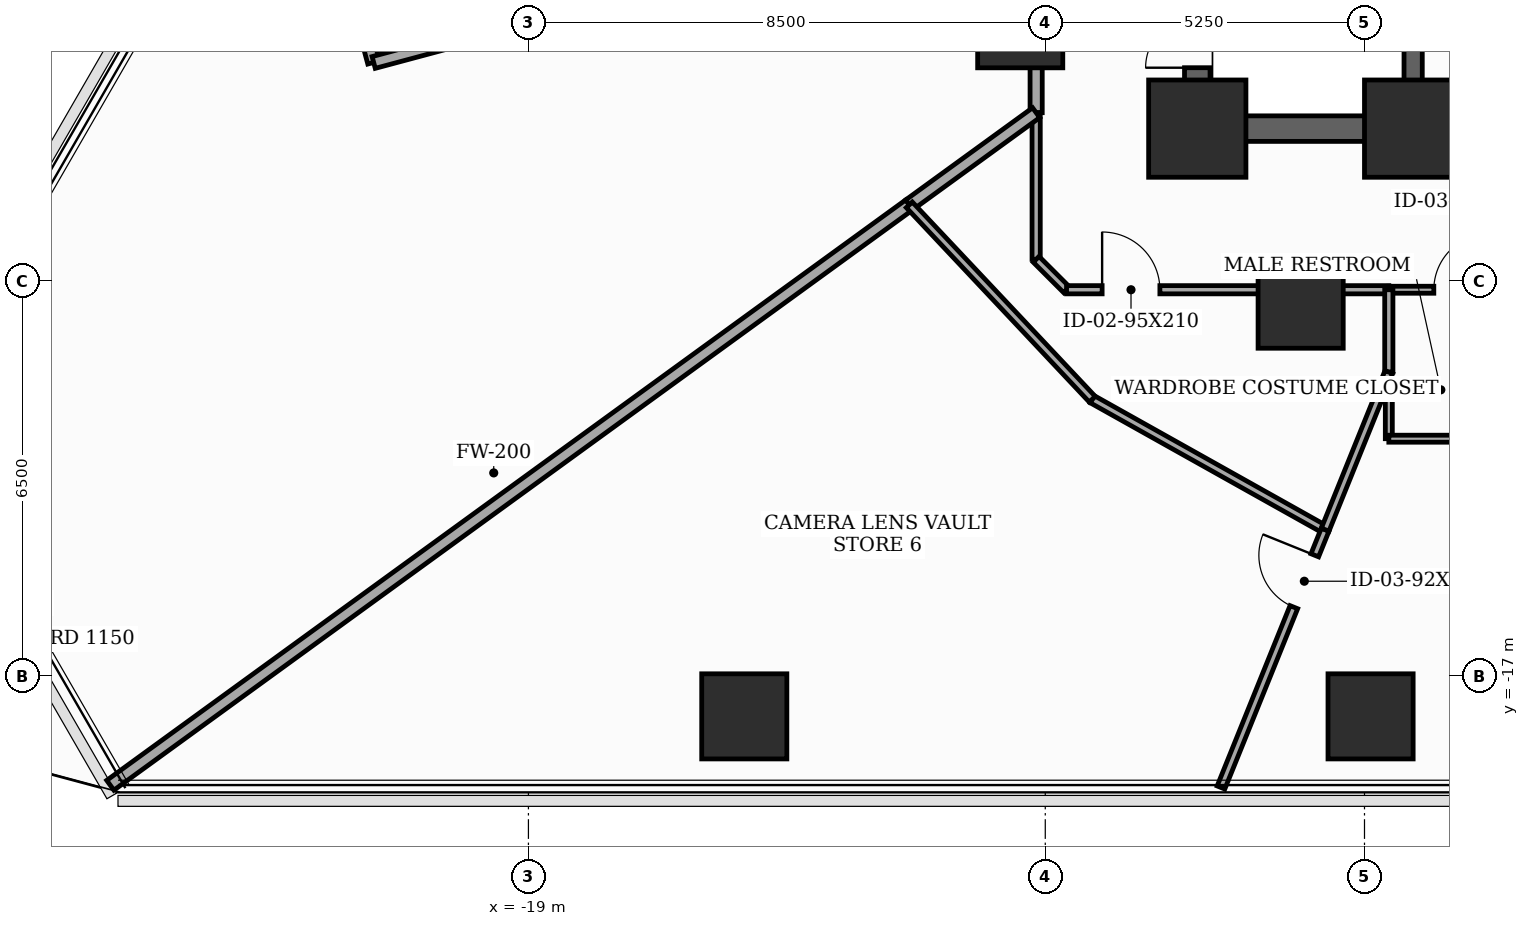
"""IFC4 building model, lengths in metres.
Left out: names, types, materials, properties, quantities, classifications, styles, units other than length and angle.
Written with IfcOpenShell. Run it as: python <this file> out.ifc"""

import sys

from ifc_helpers import new_model, si_unit, direction, frame, frame_2d, origin, origin_2d, place, context, subcontext, project, spatial, rectangle, extrude, element, fill, save


model = new_model("IFC4")
c1 = context("Model", 3, precision=1e-05, world=origin(), true_north=direction((0.0, 1.0)))
c2 = subcontext(c1, "Body", "Model", "MODEL_VIEW")
j1 = project(units=[si_unit("LENGTHUNIT", "METRE"), si_unit("PLANEANGLEUNIT", "RADIAN")], contexts=[c1])
p1 = place(None, origin())
s1 = spatial("IfcSite", under=j1, at=p1, CompositionType="ELEMENT")
p2 = place(p1, origin())
s2 = spatial("IfcBuilding", under=s1, at=p2, CompositionType="ELEMENT")
p3 = place(p2, frame((0.0, 0.0, 37.1)))
s3 = spatial("IfcBuildingStorey", under=s2, at=p3, CompositionType="ELEMENT", Elevation=37.1)
for number, where, z_axis, x_axis in (
    (1, (-8.0, -8.0, 0.0), (0.0, 0.0, 1.0), (1.0, 0.0, 0.0)),
    (2, (-4.45, -8.0, 0.0), (0.0, 0.0, 1.0), (1.0, 0.0, 0.0)),
):
    element("IfcColumn", number, at=place(p3, frame(where, z_axis=z_axis, x_axis=x_axis)), inside=s3, PredefinedType="COLUMN", context=c2, shape_type="SweptSolid", body=[
        extrude(rectangle(XDim=1.6, YDim=1.6, at=origin_2d()), origin(), (0.0, 0.0, 1.0), 3.7),
    ])
for number, where, z_axis, x_axis in (
    (3, (-10.912, -6.3, 0.0), (0.0, 0.0, 1.0), (1.0, 0.0, 0.0)),
    (4, (-6.3, -10.912, 0.0), (0.0, 0.0, 1.0), (1.0, 0.0, 0.0)),
    (5, (-15.45, -17.667, 0.0), (0.0, 0.0, 1.0), (1.0, 0.0, 0.0)),
    (6, (-5.15, -17.667, 0.0), (0.0, 0.0, 1.0), (1.0, 0.0, 0.0)),
):
    element("IfcColumn", number, at=place(p3, frame(where, z_axis=z_axis, x_axis=x_axis)), inside=s3, PredefinedType="COLUMN", context=c2, shape_type="SweptSolid", body=[
        extrude(rectangle(XDim=1.4, YDim=1.4, at=origin_2d()), origin(), (0.0, 0.0, 1.0), 3.7),
    ])
p4 = place(p3, frame((-8.0, -8.0, 0.0), z_axis=(0.0, 0.0, 1.0), x_axis=(0.0, 1.0, 0.0)))
e7 = element("IfcWall", 7, at=p4, inside=s3, PredefinedType="SHEAR", context=c2, shape_type="SweptSolid", body=[
    extrude(rectangle(XDim=16.0, YDim=0.42, at=frame_2d((8.0, 0.0))), origin(), (0.0, 0.0, 1.0), 3.5),
])
p5 = place(p4, frame((1.002, 0.0, 0.0)))
e8 = element("IfcOpeningElement", 8, at=p5, cuts=e7, PredefinedType="OPENING", context=c2, shape_type="SweptSolid", body=[
    extrude(rectangle(XDim=0.85, YDim=2.02, at=frame_2d((0.425, 1.01))), frame((0.0, 0.22, 0.0), z_axis=(0.0, -1.0, 0.0), x_axis=(1.0, 0.0, 0.0)), (0.0, 0.0, 1.0), 0.44),
])
p6 = place(p4, frame((5.35, 0.0, 0.0)))
e9 = element("IfcOpeningElement", 9, at=p6, cuts=e7, PredefinedType="OPENING", context=c2, shape_type="SweptSolid", body=[
    extrude(rectangle(XDim=1.05, YDim=2.15, at=frame_2d((0.525, 1.075))), frame((0.0, 0.22, 0.0), z_axis=(0.0, -1.0, 0.0), x_axis=(1.0, 0.0, 0.0)), (0.0, 0.0, 1.0), 0.44),
])
p7 = place(p3, frame((-8.0, -8.0, 0.0), z_axis=(0.0, 0.0, 1.0), x_axis=(1.0, 0.0, 0.0)))
e10 = element("IfcWall", 10, at=p7, inside=s3, PredefinedType="SHEAR", context=c2, shape_type="SweptSolid", body=[
    extrude(rectangle(XDim=16.0, YDim=0.42, at=frame_2d((8.0, 0.0))), origin(), (0.0, 0.0, 1.0), 3.5),
])
p8 = place(p7, frame((5.2, 0.0, 0.0)))
e11 = element("IfcOpeningElement", 11, at=p8, cuts=e10, PredefinedType="OPENING", context=c2, shape_type="SweptSolid", body=[
    extrude(rectangle(XDim=0.95, YDim=2.1, at=frame_2d((0.475, 1.05))), frame((0.0, 0.22, 0.0), z_axis=(0.0, -1.0, 0.0), x_axis=(1.0, 0.0, 0.0)), (0.0, 0.0, 1.0), 0.44),
])
p9 = place(p7, frame((9.8, 0.0, 0.0)))
e12 = element("IfcOpeningElement", 12, at=p9, cuts=e10, PredefinedType="OPENING", context=c2, shape_type="SweptSolid", body=[
    extrude(rectangle(XDim=0.95, YDim=2.1, at=frame_2d((0.475, 1.05))), frame((0.0, 0.22, 0.0), z_axis=(0.0, -1.0, 0.0), x_axis=(1.0, 0.0, 0.0)), (0.0, 0.0, 1.0), 0.44),
])
p10 = place(p3, frame((-4.45, -7.79, 0.0), z_axis=(0.0, 0.0, 1.0), x_axis=(0.0, 1.0, 0.0)))
e13 = element("IfcWall", 13, at=p10, inside=s3, PredefinedType="SHEAR", context=c2, shape_type="SweptSolid", body=[
    extrude(rectangle(XDim=15.58, YDim=0.3, at=frame_2d((7.79, 0.0))), origin(), (0.0, 0.0, 1.0), 3.5),
])
p11 = place(p3, frame((-22.115, -4.787, 0.0), z_axis=(0.0, 0.0, 1.0), x_axis=(0.259105843213, -0.965848933329, 0.0)))
e14 = element("IfcWall", 14, at=p11, inside=s3, PredefinedType="SOLIDWALL", context=c2, shape_type="SweptSolid", body=[
    extrude(rectangle(XDim=2.2, YDim=0.2, at=frame_2d((1.1, 0.0))), origin(), (0.0, 0.0, 1.0), 2.935),
])
p12 = place(p3, frame((-21.545, -6.912, 0.0), z_axis=(0.0, 0.0, 1.0), x_axis=(0.965906888357, 0.258889712088, 0.0)))
e15 = element("IfcWall", 15, at=p12, inside=s3, PredefinedType="SOLIDWALL", context=c2, shape_type="SweptSolid", body=[
    extrude(rectangle(XDim=11.28, YDim=0.2, at=frame_2d((5.64, 0.0))), origin(), (0.0, 0.0, 1.0), 2.785),
])
p13 = place(p3, frame((-10.65, -3.992, 0.0), z_axis=(0.0, 0.0, 1.0), x_axis=(0.0, -1.0, 0.0)))
e16 = element("IfcWall", 16, at=p13, inside=s3, PredefinedType="SOLIDWALL", context=c2, shape_type="SweptSolid", body=[
    extrude(rectangle(XDim=3.746, YDim=0.2, at=frame_2d((1.873, 0.0))), origin(), (0.0, 0.0, 1.0), 2.785),
])
p14 = place(p3, frame((-10.65, -7.738, 0.0), z_axis=(0.0, 0.0, 1.0), x_axis=(0.0, -1.0, 0.0)))
e17 = element("IfcWall", 17, at=p14, inside=s3, PredefinedType="PARTITIONING", context=c2, shape_type="SweptSolid", body=[
    extrude(rectangle(XDim=2.412, YDim=0.135, at=frame_2d((1.206, 0.0))), origin(), (0.0, 0.0, 1.0), 3.5),
])
p15 = place(p3, frame((-10.65, -10.15, 0.0), z_axis=(0.0, 0.0, 1.0), x_axis=(0.707106781187, -0.707106781187, 0.0)))
e18 = element("IfcWall", 18, at=p15, inside=s3, PredefinedType="PARTITIONING", context=c2, shape_type="SweptSolid", body=[
    extrude(rectangle(XDim=0.707, YDim=0.135, at=frame_2d((0.354, 0.0))), origin(), (0.0, 0.0, 1.0), 3.5),
])
p16 = place(p3, frame((-10.15, -10.65, 0.0), z_axis=(0.0, 0.0, 1.0), x_axis=(1.0, 0.0, 0.0)))
e19 = element("IfcWall", 19, at=p16, inside=s3, PredefinedType="PARTITIONING", context=c2, shape_type="SweptSolid", body=[
    extrude(rectangle(XDim=5.3, YDim=0.135, at=frame_2d((2.65, 0.0))), origin(), (0.0, 0.0, 1.0), 2.785),
])
p17 = place(p16, frame((0.585, 0.0, 0.0)))
e20 = element("IfcOpeningElement", 20, at=p17, cuts=e19, PredefinedType="OPENING", context=c2, shape_type="SweptSolid", body=[
    extrude(rectangle(XDim=0.95, YDim=2.1, at=frame_2d((0.475, 1.05))), frame((0.0, 0.077, 0.0), z_axis=(0.0, -1.0, 0.0), x_axis=(1.0, 0.0, 0.0)), (0.0, 0.0, 1.0), 0.155),
])
p18 = place(p3, frame((-4.85, -10.65, 0.0), z_axis=(0.0, 0.0, 1.0), x_axis=(1.0, 0.0, 0.0)))
e21 = element("IfcWall", 21, at=p18, inside=s3, PredefinedType="PARTITIONING", context=c2, shape_type="SweptSolid", body=[
    extrude(rectangle(XDim=2.4, YDim=0.115, at=frame_2d((1.2, 0.0))), origin(), (0.0, 0.0, 1.0), 3.5),
])
p19 = place(p18, frame((0.74, 0.0, 0.0)))
e22 = element("IfcOpeningElement", 22, at=p19, cuts=e21, PredefinedType="OPENING", context=c2, shape_type="SweptSolid", body=[
    extrude(rectangle(XDim=0.92, YDim=2.1, at=frame_2d((0.46, 1.05))), frame((0.0, 0.067, 0.0), z_axis=(0.0, -1.0, 0.0), x_axis=(1.0, 0.0, 0.0)), (0.0, 0.0, 1.0), 0.135),
])
p20 = place(p3, frame((-25.876, -18.8, 0.0), z_axis=(0.0, 0.0, 1.0), x_axis=(0.809014839236, 0.587788218575, 0.0)))
e23 = element("IfcWall", 23, at=p20, inside=s3, PredefinedType="SOLIDWALL", context=c2, shape_type="SweptSolid", body=[
    extrude(rectangle(XDim=16.242, YDim=0.2, at=frame_2d((8.121, 0.0))), origin(), (0.0, 0.0, 1.0), 2.935),
])
p21 = place(p3, frame((-12.736, -9.253, 0.0), z_axis=(0.0, 0.0, 1.0), x_axis=(0.809165833136, 0.587580338749, 0.0)))
e24 = element("IfcWall", 24, at=p21, inside=s3, PredefinedType="SOLIDWALL", context=c2, shape_type="SweptSolid", body=[
    extrude(rectangle(XDim=2.578, YDim=0.2, at=frame_2d((1.289, 0.0))), origin(), (0.0, 0.0, 1.0), 3.5),
])
p22 = place(p3, frame((-5.897, -14.596, 0.0), z_axis=(0.0, 0.0, 1.0), x_axis=(-0.87248894478, 0.488633851915, 0.0)))
e25 = element("IfcWall", 25, at=p22, inside=s3, PredefinedType="PARTITIONING", context=c2, shape_type="SweptSolid", body=[
    extrude(rectangle(XDim=4.39, YDim=0.135, at=frame_2d((2.195, 0.0))), origin(), (0.0, 0.0, 1.0), 2.685),
])
p23 = place(p3, frame((-9.727, -12.451, 0.0), z_axis=(0.0, 0.0, 1.0), x_axis=(-0.685262368975, 0.728296289752, 0.0)))
e26 = element("IfcWall", 26, at=p23, inside=s3, PredefinedType="PARTITIONING", context=c2, shape_type="SweptSolid", body=[
    extrude(rectangle(XDim=4.391, YDim=0.135, at=frame_2d((2.196, 0.0))), origin(), (0.0, 0.0, 1.0), 3.5),
])
p24 = place(p3, frame((-7.61, -18.837, 0.0), z_axis=(0.0, 0.0, 1.0), x_axis=(0.374545124537, 0.927208687236, 0.0)))
e27 = element("IfcWall", 27, at=p24, inside=s3, PredefinedType="PARTITIONING", context=c2, shape_type="SweptSolid", body=[
    extrude(rectangle(XDim=4.574, YDim=0.135, at=frame_2d((2.287, 0.0))), origin(), (0.0, 0.0, 1.0), 2.685),
])
p25 = place(p24, frame((3.199, 0.0, 0.0)))
e28 = element("IfcOpeningElement", 28, at=p25, cuts=e27, PredefinedType="OPENING", context=c2, shape_type="SweptSolid", body=[
    extrude(rectangle(XDim=0.92, YDim=2.1, at=frame_2d((0.46, 1.05))), frame((0.0, 0.077, 0.0), z_axis=(0.0, -1.0, 0.0), x_axis=(1.0, 0.0, 0.0)), (0.0, 0.0, 1.0), 0.155),
])
p26 = place(p3, frame((-4.85, -12.004, 0.0), z_axis=(0.0, 0.0, 1.0), x_axis=(0.0, 1.0, 0.0)))
e29 = element("IfcWall", 29, at=p26, inside=s3, PredefinedType="PARTITIONING", context=c2, shape_type="SweptSolid", body=[
    extrude(rectangle(XDim=1.354, YDim=0.135, at=frame_2d((0.677, 0.0))), origin(), (0.0, 0.0, 1.0), 2.785),
])
p27 = place(p3, frame((-5.897, -14.596, 0.0), z_axis=(0.0, 0.0, 1.0), x_axis=(0.374490485533, 0.92723075674, 0.0)))
e30 = element("IfcWall", 30, at=p27, inside=s3, PredefinedType="PARTITIONING", context=c2, shape_type="SweptSolid", body=[
    extrude(rectangle(XDim=2.795, YDim=0.135, at=frame_2d((1.398, 0.0))), origin(), (0.0, 0.0, 1.0), 2.685),
])
p28 = place(p3, frame((-4.85, -12.298, 0.0), z_axis=(0.0, 0.0, 1.0), x_axis=(0.0, -1.0, 0.0)))
e31 = element("IfcWall", 31, at=p28, inside=s3, PredefinedType="PARTITIONING", context=c2, shape_type="SweptSolid", body=[
    extrude(rectangle(XDim=0.802, YDim=0.115, at=frame_2d((0.401, 0.0))), origin(), (0.0, 0.0, 1.0), 3.5),
])
p29 = place(p3, frame((-4.85, -13.1, 0.0), z_axis=(0.0, 0.0, 1.0), x_axis=(1.0, 0.0, 0.0)))
e32 = element("IfcWall", 32, at=p29, inside=s3, PredefinedType="PARTITIONING", context=c2, shape_type="SweptSolid", body=[
    extrude(rectangle(XDim=2.4, YDim=0.115, at=frame_2d((1.2, 0.0))), origin(), (0.0, 0.0, 1.0), 3.5),
])
p30 = place(p5, origin())
e33 = element("IfcDoor", 33, at=p30, inside=s3, OperationType="SINGLE_SWING_LEFT", PredefinedType="TRAPDOOR", context=c2, shape_type="SweptSolid", body=[
    extrude(rectangle(XDim=0.85, YDim=2.02, at=frame_2d((0.425, 1.01))), frame((0.0, 0.025, 0.0), z_axis=(0.0, -1.0, 0.0), x_axis=(1.0, 0.0, 0.0)), (0.0, 0.0, 1.0), 0.05),
])
fill(e8, e33)
p31 = place(p17, origin())
e34 = element("IfcDoor", 34, at=p31, inside=s3, OperationType="SINGLE_SWING_LEFT", PredefinedType="DOOR", context=c2, shape_type="SweptSolid", body=[
    extrude(rectangle(XDim=0.95, YDim=2.1, at=frame_2d((0.475, 1.05))), frame((0.0, 0.025, 0.0), z_axis=(0.0, -1.0, 0.0), x_axis=(1.0, 0.0, 0.0)), (0.0, 0.0, 1.0), 0.05),
])
fill(e20, e34)
p32 = place(p19, origin())
e35 = element("IfcDoor", 35, at=p32, inside=s3, OperationType="SINGLE_SWING_RIGHT", PredefinedType="DOOR", context=c2, shape_type="SweptSolid", body=[
    extrude(rectangle(XDim=0.92, YDim=2.1, at=frame_2d((0.46, 1.05))), frame((0.0, 0.025, 0.0), z_axis=(0.0, -1.0, 0.0), x_axis=(1.0, 0.0, 0.0)), (0.0, 0.0, 1.0), 0.05),
])
fill(e22, e35)
p33 = place(p25, origin())
e36 = element("IfcDoor", 36, at=p33, inside=s3, OperationType="SINGLE_SWING_RIGHT", PredefinedType="DOOR", context=c2, shape_type="SweptSolid", body=[
    extrude(rectangle(XDim=0.92, YDim=2.1, at=frame_2d((0.46, 1.05))), frame((0.0, 0.025, 0.0), z_axis=(0.0, -1.0, 0.0), x_axis=(1.0, 0.0, 0.0)), (0.0, 0.0, 1.0), 0.05),
])
fill(e28, e36)
save(model, sys.argv[1])
